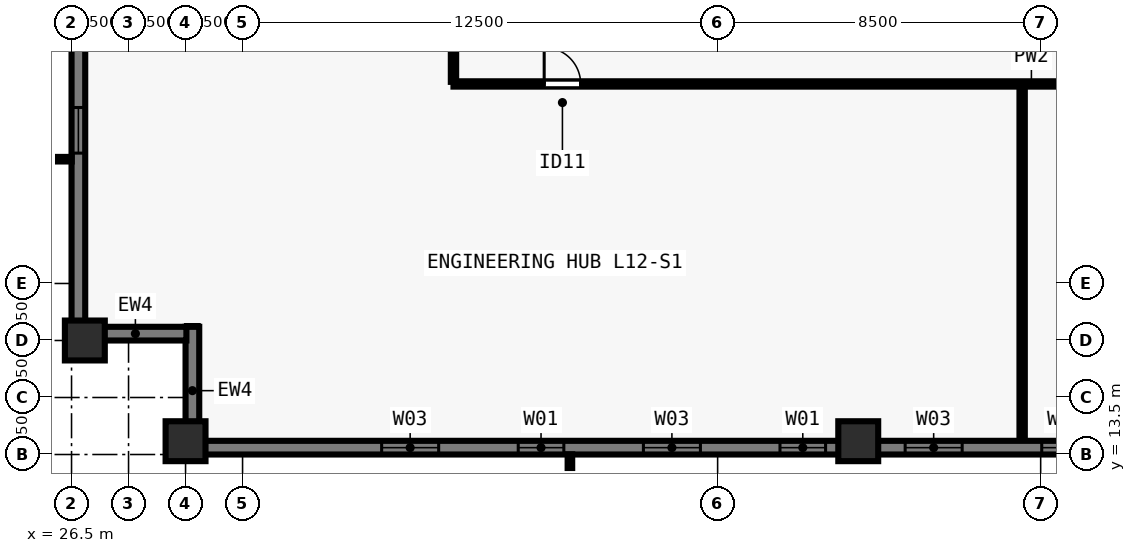
"""IFC4 building model, lengths in metres.
Left out: names, types, materials, properties, quantities, classifications, styles, units other than length and angle.
Written with IfcOpenShell. Run it as: python <this file> out.ifc"""

import sys

from ifc_helpers import new_model, si_unit, direction, frame, frame_2d, origin, origin_2d, place, context, subcontext, project, spatial, rectangle, extrude, element, fill, save


model = new_model("IFC4")
c1 = context("Model", 3, precision=1e-05, world=origin(), true_north=direction((0.0, 1.0)))
c2 = subcontext(c1, "Body", "Model", "MODEL_VIEW")
j1 = project(units=[si_unit("LENGTHUNIT", "METRE"), si_unit("PLANEANGLEUNIT", "RADIAN")], contexts=[c1])
p1 = place(None, origin())
s1 = spatial("IfcSite", under=j1, at=p1, CompositionType="ELEMENT")
p2 = place(p1, origin())
s2 = spatial("IfcBuilding", under=s1, at=p2, CompositionType="ELEMENT")
p3 = place(p2, frame((0.0, 0.0, 48.0)))
s3 = spatial("IfcBuildingStorey", under=s2, at=p3, CompositionType="ELEMENT", Elevation=48.0)
for number, where, z_axis, x_axis in (
    (1, (29.5, 13.85, 0.0), (0.0, 0.0, 1.0), (1.0, 0.0, 0.0)),
    (2, (47.2, 13.85, 0.0), (0.0, 0.0, 1.0), (1.0, 0.0, 0.0)),
    (3, (26.85, 16.5, 0.0), (0.0, 0.0, 1.0), (0.0, 1.0, 0.0)),
):
    element("IfcColumn", number, at=place(p3, frame(where, z_axis=z_axis, x_axis=x_axis)), inside=s3, PredefinedType="COLUMN", context=c2, shape_type="SweptSolid", body=[
        extrude(rectangle(XDim=1.05, YDim=1.05, at=origin_2d()), origin(), (0.0, 0.0, 1.0), 3.5),
    ])
p4 = place(p3, frame((58.2, 13.68, 0.0), z_axis=(0.0, 0.0, 1.0), x_axis=(-1.0, 0.0, 0.0)))
e4 = element("IfcWall", 4, at=p4, inside=s3, PredefinedType="SOLIDWALL", context=c2, shape_type="SweptSolid", body=[
    extrude(rectangle(XDim=28.362, YDim=0.36, at=frame_2d((14.181, 0.0))), origin(), (0.0, 0.0, 1.0), 3.28),
])
p5 = place(p4, frame((4.972, 0.0, 0.8)))
e5 = element("IfcOpeningElement", 5, at=p5, cuts=e4, PredefinedType="OPENING", context=c2, shape_type="SweptSolid", body=[
    extrude(rectangle(XDim=1.2, YDim=1.544, at=frame_2d((0.6, 0.772))), frame((0.0, 0.19, 0.0), z_axis=(0.0, -1.0, 0.0), x_axis=(1.0, 0.0, 0.0)), (0.0, 0.0, 1.0), 0.38),
])
p6 = place(p4, frame((8.265, 0.0, 0.8)))
e6 = element("IfcOpeningElement", 6, at=p6, cuts=e4, PredefinedType="OPENING", context=c2, shape_type="SweptSolid", body=[
    extrude(rectangle(XDim=1.5, YDim=1.544, at=frame_2d((0.75, 0.772))), frame((0.0, 0.19, 0.0), z_axis=(0.0, -1.0, 0.0), x_axis=(1.0, 0.0, 0.0)), (0.0, 0.0, 1.0), 0.38),
])
p7 = place(p4, frame((11.859, 0.0, 0.8)))
e7 = element("IfcOpeningElement", 7, at=p7, cuts=e4, PredefinedType="OPENING", context=c2, shape_type="SweptSolid", body=[
    extrude(rectangle(XDim=1.2, YDim=1.544, at=frame_2d((0.6, 0.772))), frame((0.0, 0.19, 0.0), z_axis=(0.0, -1.0, 0.0), x_axis=(1.0, 0.0, 0.0)), (0.0, 0.0, 1.0), 0.38),
])
p8 = place(p4, frame((15.153, 0.0, 0.8)))
e8 = element("IfcOpeningElement", 8, at=p8, cuts=e4, PredefinedType="OPENING", context=c2, shape_type="SweptSolid", body=[
    extrude(rectangle(XDim=1.5, YDim=1.544, at=frame_2d((0.75, 0.772))), frame((0.0, 0.19, 0.0), z_axis=(0.0, -1.0, 0.0), x_axis=(1.0, 0.0, 0.0)), (0.0, 0.0, 1.0), 0.38),
])
p9 = place(p4, frame((18.747, 0.0, 0.8)))
e9 = element("IfcOpeningElement", 9, at=p9, cuts=e4, PredefinedType="OPENING", context=c2, shape_type="SweptSolid", body=[
    extrude(rectangle(XDim=1.2, YDim=1.544, at=frame_2d((0.6, 0.772))), frame((0.0, 0.19, 0.0), z_axis=(0.0, -1.0, 0.0), x_axis=(1.0, 0.0, 0.0)), (0.0, 0.0, 1.0), 0.38),
])
p10 = place(p4, frame((22.04, 0.0, 0.8)))
e10 = element("IfcOpeningElement", 10, at=p10, cuts=e4, PredefinedType="OPENING", context=c2, shape_type="SweptSolid", body=[
    extrude(rectangle(XDim=1.5, YDim=1.544, at=frame_2d((0.75, 0.772))), frame((0.0, 0.19, 0.0), z_axis=(0.0, -1.0, 0.0), x_axis=(1.0, 0.0, 0.0)), (0.0, 0.0, 1.0), 0.38),
])
p11 = place(p3, frame((29.68, 13.5, 0.0), z_axis=(0.0, 0.0, 1.0), x_axis=(0.0, 1.0, 0.0)))
e11 = element("IfcWall", 11, at=p11, inside=s3, PredefinedType="SOLIDWALL", context=c2, shape_type="SweptSolid", body=[
    extrude(rectangle(XDim=3.36, YDim=0.36, at=frame_2d((1.68, 0.0))), origin(), (0.0, 0.0, 1.0), 3.28),
])
p12 = place(p3, frame((29.522, 16.68, 0.0), z_axis=(0.0, 0.0, 1.0), x_axis=(-1.0, 0.0, 0.0)))
e12 = element("IfcWall", 12, at=p12, inside=s3, PredefinedType="SOLIDWALL", context=c2, shape_type="SweptSolid", body=[
    extrude(rectangle(XDim=2.684, YDim=0.36, at=frame_2d((1.342, 0.0))), origin(), (0.0, 0.0, 1.0), 3.28),
])
p13 = place(p3, frame((26.68, 16.5, 0.0), z_axis=(0.0, 0.0, 1.0), x_axis=(0.0, 1.0, 0.0)))
e13 = element("IfcWall", 13, at=p13, inside=s3, PredefinedType="SOLIDWALL", context=c2, shape_type="SweptSolid", body=[
    extrude(rectangle(XDim=44.662, YDim=0.36, at=frame_2d((22.331, 0.0))), origin(), (0.0, 0.0, 1.0), 3.28),
])
p14 = place(p13, frame((4.93, 0.0, 0.8)))
e14 = element("IfcOpeningElement", 14, at=p14, cuts=e13, PredefinedType="OPENING", context=c2, shape_type="SweptSolid", body=[
    extrude(rectangle(XDim=1.2, YDim=1.544, at=frame_2d((0.6, 0.772))), frame((0.0, 0.19, 0.0), z_axis=(0.0, -1.0, 0.0), x_axis=(1.0, 0.0, 0.0)), (0.0, 0.0, 1.0), 0.38),
])
p15 = place(p13, frame((8.14, 0.0, 0.8)))
e15 = element("IfcOpeningElement", 15, at=p15, cuts=e13, PredefinedType="OPENING", context=c2, shape_type="SweptSolid", body=[
    extrude(rectangle(XDim=1.5, YDim=1.544, at=frame_2d((0.75, 0.772))), frame((0.0, 0.19, 0.0), z_axis=(0.0, -1.0, 0.0), x_axis=(1.0, 0.0, 0.0)), (0.0, 0.0, 1.0), 0.38),
])
p16 = place(p13, frame((11.65, 0.0, 0.8)))
e16 = element("IfcOpeningElement", 16, at=p16, cuts=e13, PredefinedType="OPENING", context=c2, shape_type="SweptSolid", body=[
    extrude(rectangle(XDim=1.2, YDim=1.544, at=frame_2d((0.6, 0.772))), frame((0.0, 0.19, 0.0), z_axis=(0.0, -1.0, 0.0), x_axis=(1.0, 0.0, 0.0)), (0.0, 0.0, 1.0), 0.38),
])
p17 = place(p13, frame((14.861, 0.0, 0.8)))
e17 = element("IfcOpeningElement", 17, at=p17, cuts=e13, PredefinedType="OPENING", context=c2, shape_type="SweptSolid", body=[
    extrude(rectangle(XDim=1.5, YDim=1.544, at=frame_2d((0.75, 0.772))), frame((0.0, 0.19, 0.0), z_axis=(0.0, -1.0, 0.0), x_axis=(1.0, 0.0, 0.0)), (0.0, 0.0, 1.0), 0.38),
])
p18 = place(p13, frame((18.821, 0.0, 0.8)))
e18 = element("IfcOpeningElement", 18, at=p18, cuts=e13, PredefinedType="OPENING", context=c2, shape_type="SweptSolid", body=[
    extrude(rectangle(XDim=1.2, YDim=1.544, at=frame_2d((0.6, 0.772))), frame((0.0, 0.19, 0.0), z_axis=(0.0, -1.0, 0.0), x_axis=(1.0, 0.0, 0.0)), (0.0, 0.0, 1.0), 0.38),
])
p19 = place(p13, frame((20.731, 0.0, 0.8)))
e19 = element("IfcOpeningElement", 19, at=p19, cuts=e13, PredefinedType="OPENING", context=c2, shape_type="SweptSolid", body=[
    extrude(rectangle(XDim=1.5, YDim=1.544, at=frame_2d((0.75, 0.772))), frame((0.0, 0.19, 0.0), z_axis=(0.0, -1.0, 0.0), x_axis=(1.0, 0.0, 0.0)), (0.0, 0.0, 1.0), 0.38),
])
p20 = place(p13, frame((25.091, 0.0, 0.8)))
e20 = element("IfcOpeningElement", 20, at=p20, cuts=e13, PredefinedType="OPENING", context=c2, shape_type="SweptSolid", body=[
    extrude(rectangle(XDim=1.2, YDim=1.544, at=frame_2d((0.6, 0.772))), frame((0.0, 0.19, 0.0), z_axis=(0.0, -1.0, 0.0), x_axis=(1.0, 0.0, 0.0)), (0.0, 0.0, 1.0), 0.38),
])
p21 = place(p13, frame((31.812, 0.0, 0.8)))
e21 = element("IfcOpeningElement", 21, at=p21, cuts=e13, PredefinedType="OPENING", context=c2, shape_type="SweptSolid", body=[
    extrude(rectangle(XDim=1.2, YDim=1.544, at=frame_2d((0.6, 0.772))), frame((0.0, 0.19, 0.0), z_axis=(0.0, -1.0, 0.0), x_axis=(1.0, 0.0, 0.0)), (0.0, 0.0, 1.0), 0.38),
])
p22 = place(p13, frame((35.022, 0.0, 0.8)))
e22 = element("IfcOpeningElement", 22, at=p22, cuts=e13, PredefinedType="OPENING", context=c2, shape_type="SweptSolid", body=[
    extrude(rectangle(XDim=1.5, YDim=1.544, at=frame_2d((0.75, 0.772))), frame((0.0, 0.19, 0.0), z_axis=(0.0, -1.0, 0.0), x_axis=(1.0, 0.0, 0.0)), (0.0, 0.0, 1.0), 0.38),
])
p23 = place(p13, frame((38.532, 0.0, 0.8)))
e23 = element("IfcOpeningElement", 23, at=p23, cuts=e13, PredefinedType="OPENING", context=c2, shape_type="SweptSolid", body=[
    extrude(rectangle(XDim=1.2, YDim=1.544, at=frame_2d((0.6, 0.772))), frame((0.0, 0.19, 0.0), z_axis=(0.0, -1.0, 0.0), x_axis=(1.0, 0.0, 0.0)), (0.0, 0.0, 1.0), 0.38),
])
p24 = place(p3, frame((36.55, 23.25, 0.0), z_axis=(0.0, 0.0, 1.0), x_axis=(1.0, 0.0, 0.0)))
e24 = element("IfcWall", 24, at=p24, inside=s3, PredefinedType="PARTITIONING", context=c2, shape_type="SweptSolid", body=[
    extrude(rectangle(XDim=30.9, YDim=0.14, at=frame_2d((15.45, 0.0))), origin(), (0.0, 0.0, 1.0), 3.28),
])
p25 = place(p24, frame((2.386, 0.0, 0.0)))
e25 = element("IfcOpeningElement", 25, at=p25, cuts=e24, PredefinedType="OPENING", context=c2, shape_type="SweptSolid", body=[
    extrude(rectangle(XDim=0.96, YDim=2.12, at=frame_2d((0.48, 1.06))), frame((0.0, 0.08, 0.0), z_axis=(0.0, -1.0, 0.0), x_axis=(1.0, 0.0, 0.0)), (0.0, 0.0, 1.0), 0.16),
])
p26 = place(p24, frame((27.066, 0.0, 0.0)))
e26 = element("IfcOpeningElement", 26, at=p26, cuts=e24, PredefinedType="OPENING", context=c2, shape_type="SweptSolid", body=[
    extrude(rectangle(XDim=0.96, YDim=2.12, at=frame_2d((0.48, 1.06))), frame((0.0, 0.08, 0.0), z_axis=(0.0, -1.0, 0.0), x_axis=(1.0, 0.0, 0.0)), (0.0, 0.0, 1.0), 0.16),
])
p27 = place(p3, frame((36.55, 23.305, 0.0), z_axis=(0.0, 0.0, 1.0), x_axis=(0.0, 1.0, 0.0)))
e27 = element("IfcWall", 27, at=p27, inside=s3, PredefinedType="PARTITIONING", context=c2, shape_type="SweptSolid", body=[
    extrude(rectangle(XDim=31.39, YDim=0.14, at=frame_2d((15.695, 0.0))), origin(), (0.0, 0.0, 1.0), 3.28),
])
p28 = place(p27, frame((3.307, 0.0, 0.0)))
e28 = element("IfcOpeningElement", 28, at=p28, cuts=e27, PredefinedType="OPENING", context=c2, shape_type="SweptSolid", body=[
    extrude(rectangle(XDim=0.96, YDim=2.12, at=frame_2d((0.48, 1.06))), frame((0.0, 0.08, 0.0), z_axis=(0.0, -1.0, 0.0), x_axis=(1.0, 0.0, 0.0)), (0.0, 0.0, 1.0), 0.16),
])
p29 = place(p27, frame((11.25, 0.0, 0.0)))
e29 = element("IfcOpeningElement", 29, at=p29, cuts=e27, PredefinedType="OPENING", context=c2, shape_type="SweptSolid", body=[
    extrude(rectangle(XDim=0.96, YDim=2.12, at=frame_2d((0.48, 1.06))), frame((0.0, 0.08, 0.0), z_axis=(0.0, -1.0, 0.0), x_axis=(1.0, 0.0, 0.0)), (0.0, 0.0, 1.0), 0.16),
])
p30 = place(p27, frame((19.075, 0.0, 0.0)))
e30 = element("IfcOpeningElement", 30, at=p30, cuts=e27, PredefinedType="OPENING", context=c2, shape_type="SweptSolid", body=[
    extrude(rectangle(XDim=0.96, YDim=2.12, at=frame_2d((0.48, 1.06))), frame((0.0, 0.08, 0.0), z_axis=(0.0, -1.0, 0.0), x_axis=(1.0, 0.0, 0.0)), (0.0, 0.0, 1.0), 0.16),
])
p31 = place(p27, frame((26.782, 0.0, 0.0)))
e31 = element("IfcOpeningElement", 31, at=p31, cuts=e27, PredefinedType="OPENING", context=c2, shape_type="SweptSolid", body=[
    extrude(rectangle(XDim=0.96, YDim=2.12, at=frame_2d((0.48, 1.06))), frame((0.0, 0.08, 0.0), z_axis=(0.0, -1.0, 0.0), x_axis=(1.0, 0.0, 0.0)), (0.0, 0.0, 1.0), 0.16),
])
p32 = place(p3, frame((51.512, 13.92, 0.0), z_axis=(0.0, 0.0, 1.0), x_axis=(0.0, 1.0, 0.0)))
e32 = element("IfcWall", 32, at=p32, inside=s3, PredefinedType="PARTITIONING", context=c2, shape_type="SweptSolid", body=[
    extrude(rectangle(XDim=9.23, YDim=0.14, at=frame_2d((4.615, 0.0))), origin(), (0.0, 0.0, 1.0), 2.849),
])
p33 = place(p5, origin())
e33 = element("IfcWindow", 33, at=p33, inside=s3, PartitioningType="SINGLE_PANEL", PredefinedType="WINDOW", context=c2, shape_type="SweptSolid", body=[
    extrude(rectangle(XDim=1.2, YDim=1.544, at=frame_2d((0.6, 0.772))), frame((0.0, -0.05, 0.0), z_axis=(0.0, -1.0, 0.0), x_axis=(1.0, 0.0, 0.0)), (0.0, 0.0, 1.0), 0.06),
])
fill(e5, e33)
p34 = place(p6, origin())
e34 = element("IfcWindow", 34, at=p34, inside=s3, PartitioningType="SINGLE_PANEL", PredefinedType="WINDOW", context=c2, shape_type="SweptSolid", body=[
    extrude(rectangle(XDim=1.5, YDim=1.544, at=frame_2d((0.75, 0.772))), frame((0.0, -0.05, 0.0), z_axis=(0.0, -1.0, 0.0), x_axis=(1.0, 0.0, 0.0)), (0.0, 0.0, 1.0), 0.06),
])
fill(e6, e34)
p35 = place(p7, origin())
e35 = element("IfcWindow", 35, at=p35, inside=s3, PartitioningType="SINGLE_PANEL", PredefinedType="WINDOW", context=c2, shape_type="SweptSolid", body=[
    extrude(rectangle(XDim=1.2, YDim=1.544, at=frame_2d((0.6, 0.772))), frame((0.0, -0.05, 0.0), z_axis=(0.0, -1.0, 0.0), x_axis=(1.0, 0.0, 0.0)), (0.0, 0.0, 1.0), 0.06),
])
fill(e7, e35)
p36 = place(p8, origin())
e36 = element("IfcWindow", 36, at=p36, inside=s3, PartitioningType="SINGLE_PANEL", PredefinedType="WINDOW", context=c2, shape_type="SweptSolid", body=[
    extrude(rectangle(XDim=1.5, YDim=1.544, at=frame_2d((0.75, 0.772))), frame((0.0, -0.05, 0.0), z_axis=(0.0, -1.0, 0.0), x_axis=(1.0, 0.0, 0.0)), (0.0, 0.0, 1.0), 0.06),
])
fill(e8, e36)
p37 = place(p9, origin())
e37 = element("IfcWindow", 37, at=p37, inside=s3, PartitioningType="SINGLE_PANEL", PredefinedType="WINDOW", context=c2, shape_type="SweptSolid", body=[
    extrude(rectangle(XDim=1.2, YDim=1.544, at=frame_2d((0.6, 0.772))), frame((0.0, -0.05, 0.0), z_axis=(0.0, -1.0, 0.0), x_axis=(1.0, 0.0, 0.0)), (0.0, 0.0, 1.0), 0.06),
])
fill(e9, e37)
p38 = place(p10, origin())
e38 = element("IfcWindow", 38, at=p38, inside=s3, PartitioningType="SINGLE_PANEL", PredefinedType="WINDOW", context=c2, shape_type="SweptSolid", body=[
    extrude(rectangle(XDim=1.5, YDim=1.544, at=frame_2d((0.75, 0.772))), frame((0.0, -0.05, 0.0), z_axis=(0.0, -1.0, 0.0), x_axis=(1.0, 0.0, 0.0)), (0.0, 0.0, 1.0), 0.06),
])
fill(e10, e38)
p39 = place(p14, origin())
e39 = element("IfcWindow", 39, at=p39, inside=s3, PartitioningType="SINGLE_PANEL", PredefinedType="WINDOW", context=c2, shape_type="SweptSolid", body=[
    extrude(rectangle(XDim=1.2, YDim=1.544, at=frame_2d((0.6, 0.772))), frame((0.0, -0.05, 0.0), z_axis=(0.0, -1.0, 0.0), x_axis=(1.0, 0.0, 0.0)), (0.0, 0.0, 1.0), 0.06),
])
fill(e14, e39)
p40 = place(p25, origin())
e40 = element("IfcDoor", 40, at=p40, inside=s3, OperationType="SINGLE_SWING_LEFT", PredefinedType="DOOR", context=c2, shape_type="SweptSolid", body=[
    extrude(rectangle(XDim=0.96, YDim=2.12, at=frame_2d((0.48, 1.06))), frame((0.0, 0.025, 0.0), z_axis=(0.0, -1.0, 0.0), x_axis=(1.0, 0.0, 0.0)), (0.0, 0.0, 1.0), 0.05),
])
fill(e25, e40)
save(model, sys.argv[1])
